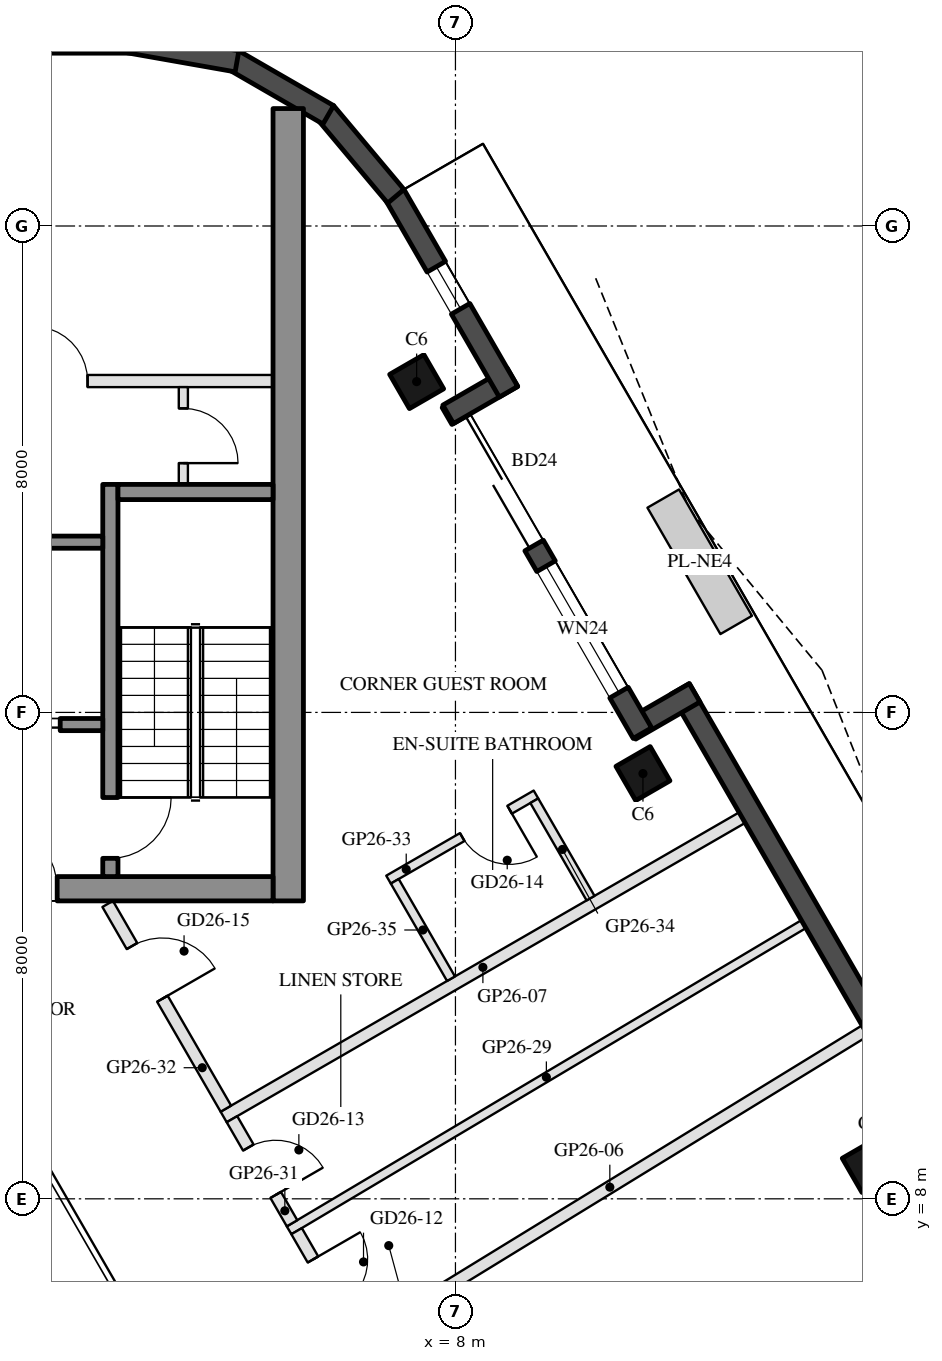
"""IFC4 building model, lengths in metres.
Left out: names, types, materials, properties, quantities, classifications, styles, units other than length and angle.
Written with IfcOpenShell. Run it as: python <this file> out.ifc"""

import sys

from ifc_helpers import new_model, si_unit, direction, frame, frame_2d, origin, origin_2d, place, context, subcontext, project, spatial, rectangle, hollow_rectangle, extrude, boolean, halfspace, element, fill, save


model = new_model("IFC4")
c1 = context("Model", 3, precision=1e-05, world=origin(), true_north=direction((0.0, 1.0)))
c2 = subcontext(c1, "Body", "Model", "MODEL_VIEW")
j1 = project(units=[si_unit("LENGTHUNIT", "METRE"), si_unit("PLANEANGLEUNIT", "RADIAN")], contexts=[c1])
p1 = place(None, origin())
s1 = spatial("IfcSite", under=j1, at=p1, CompositionType="ELEMENT")
p2 = place(p1, origin())
s2 = spatial("IfcBuilding", under=s1, at=p2, CompositionType="ELEMENT")
p3 = place(p2, frame((0.0, 0.0, 272.6)))
s3 = spatial("IfcBuildingStorey", under=s2, at=p3, CompositionType="ELEMENT", Elevation=272.6)
p4 = place(p3, frame((14.805, 8.548, 0.0), z_axis=(0.0, 0.0, 1.0), x_axis=(-0.5, 0.866025403784, 0.0)))
e1 = element("IfcColumn", 1, at=p4, inside=s3, PredefinedType="COLUMN", context=c2, shape_type="SweptSolid", body=[
    boolean("DIFFERENCE", extrude(hollow_rectangle(XDim=0.65, YDim=0.65, WallThickness=0.03, at=origin_2d()), origin(), (0.0, 0.0, 1.0), 3.7), halfspace(frame((0.0, 0.0, 3.663), z_axis=(0.0, 0.0, 1.0), x_axis=(1.0, 0.0, 0.0)), False)),
])
p5 = place(p3, frame((11.083, 14.994, 0.0), z_axis=(0.0, 0.0, 1.0), x_axis=(-0.5, 0.866025403784, 0.0)))
e2 = element("IfcColumn", 2, at=p5, inside=s3, PredefinedType="COLUMN", context=c2, shape_type="SweptSolid", body=[
    boolean("DIFFERENCE", extrude(hollow_rectangle(XDim=0.65, YDim=0.65, WallThickness=0.03, at=origin_2d()), origin(), (0.0, 0.0, 1.0), 3.7), halfspace(frame((0.0, 0.0, 3.66), z_axis=(0.0, 0.0, 1.0), x_axis=(1.0, 0.0, 0.0)), False)),
])
p6 = place(p3, frame((7.362, 21.44, 0.0), z_axis=(0.0, 0.0, 1.0), x_axis=(-0.5, 0.866025403784, 0.0)))
e3 = element("IfcColumn", 3, at=p6, inside=s3, PredefinedType="COLUMN", context=c2, shape_type="SweptSolid", body=[
    boolean("DIFFERENCE", extrude(hollow_rectangle(XDim=0.65, YDim=0.65, WallThickness=0.03, at=origin_2d()), origin(), (0.0, 0.0, 1.0), 3.7), halfspace(frame((0.0, 0.0, 3.653), z_axis=(0.0, 0.0, 1.0), x_axis=(1.0, 0.0, 0.0)), False)),
])
p7 = place(p3, frame((16.316, 8.381, 0.0), z_axis=(0.0, 0.0, 1.0), x_axis=(-0.500005190411, 0.866022407078, 0.0)))
e4 = element("IfcWall", 4, at=p7, inside=s3, PredefinedType="SOLIDWALL", context=c2, shape_type="SweptSolid", body=[
    extrude(rectangle(XDim=9.244, YDim=0.35, at=frame_2d((4.622, 0.0))), origin(), (0.0, 0.0, 1.0), 3.55),
])
p8 = place(p7, frame((1.575, 0.0, 0.3)))
e5 = element("IfcOpeningElement", 5, at=p8, cuts=e4, PredefinedType="OPENING", context=c2, shape_type="SweptSolid", body=[
    extrude(rectangle(XDim=0.8, YDim=2.65, at=frame_2d((0.4, 1.325))), frame((0.0, 0.185, 0.0), z_axis=(0.0, -1.0, 0.0), x_axis=(1.0, 0.0, 0.0)), (0.0, 0.0, 1.0), 0.37),
])
p9 = place(p3, frame((11.934, 16.322, 0.0), z_axis=(0.0, 0.0, 1.0), x_axis=(-0.866005645448, -0.500034220881, 0.0)))
e6 = element("IfcWall", 6, at=p9, inside=s3, PredefinedType="SOLIDWALL", context=c2, shape_type="SweptSolid", body=[
    extrude(rectangle(XDim=1.22, YDim=0.35, at=frame_2d((0.61, 0.0))), origin(), (0.0, 0.0, 1.0), 3.55),
])
p10 = place(p3, frame((11.075, 15.659, 0.0), z_axis=(0.0, 0.0, 1.0), x_axis=(-0.499983676521, 0.866034827944, 0.0)))
e7 = element("IfcWall", 7, at=p10, inside=s3, PredefinedType="SOLIDWALL", context=c2, shape_type="SweptSolid", body=[
    extrude(rectangle(XDim=6.283, YDim=0.35, at=frame_2d((3.142, 0.0))), origin(), (0.0, 0.0, 1.0), 3.55),
])
p11 = place(p10, frame((3.563, 0.0, 0.0)))
e8 = element("IfcOpeningElement", 8, at=p11, cuts=e7, PredefinedType="OPENING", context=c2, shape_type="SweptSolid", body=[
    extrude(rectangle(XDim=2.4, YDim=2.4, at=frame_2d((1.2, 1.2))), frame((0.0, 0.185, 0.0), z_axis=(0.0, -1.0, 0.0), x_axis=(1.0, 0.0, 0.0)), (0.0, 0.0, 1.0), 0.37),
])
p12 = place(p10, frame((0.77, 0.0, 0.3)))
e9 = element("IfcOpeningElement", 9, at=p12, cuts=e7, PredefinedType="OPENING", context=c2, shape_type="SweptSolid", body=[
    extrude(rectangle(XDim=2.4, YDim=2.65, at=frame_2d((1.2, 1.325))), frame((0.0, 0.185, 0.0), z_axis=(0.0, -1.0, 0.0), x_axis=(1.0, 0.0, 0.0)), (0.0, 0.0, 1.0), 0.37),
])
p13 = place(p3, frame((7.88, 20.903, 0.0), z_axis=(0.0, 0.0, 1.0), x_axis=(0.866005645448, 0.500034220881, 0.0)))
e10 = element("IfcWall", 10, at=p13, inside=s3, PredefinedType="SOLIDWALL", context=c2, shape_type="SweptSolid", body=[
    extrude(rectangle(XDim=1.22, YDim=0.35, at=frame_2d((0.61, 0.0))), origin(), (0.0, 0.0, 1.0), 3.55),
])
p14 = place(p3, frame((8.873, 21.274, 0.0), z_axis=(0.0, 0.0, 1.0), x_axis=(-0.50001992892, 0.866013897511, 0.0)))
e11 = element("IfcWall", 11, at=p14, inside=s3, PredefinedType="SOLIDWALL", context=c2, shape_type="SweptSolid", body=[
    extrude(rectangle(XDim=3.741, YDim=0.35, at=frame_2d((1.871, 0.0))), origin(), (0.0, 0.0, 1.0), 3.55),
])
p15 = place(p14, frame((1.575, 0.0, 0.3)))
e12 = element("IfcOpeningElement", 12, at=p15, cuts=e11, PredefinedType="OPENING", context=c2, shape_type="SweptSolid", body=[
    extrude(rectangle(XDim=0.8, YDim=2.65, at=frame_2d((0.4, 1.325))), frame((0.0, 0.185, 0.0), z_axis=(0.0, -1.0, 0.0), x_axis=(1.0, 0.0, 0.0)), (0.0, 0.0, 1.0), 0.37),
])
p16 = place(p3, frame((7.019, 24.489, 0.0), z_axis=(0.0, 0.0, 1.0), x_axis=(-0.642756114672, 0.766070869471, 0.0)))
e13 = element("IfcWall", 13, at=p16, inside=s3, PredefinedType="SOLIDWALL", context=c2, shape_type="SweptSolid", body=[
    extrude(rectangle(XDim=1.8, YDim=0.35, at=frame_2d((0.9, 0.0))), origin(), (0.0, 0.0, 1.0), 3.55),
])
for number, where, z_axis, x_axis in (
    (14, (5.909, 25.829, 0.0), (0.0, 0.0, 1.0), (-0.866, 0.5, 0.0)),
    (15, (4.408, 26.708, 0.0), (0.0, 0.0, 1.0), (-0.985, 0.174, 0.0)),
):
    element("IfcWall", number, at=place(p3, frame(where, z_axis=z_axis, x_axis=x_axis)), inside=s3, PredefinedType="SOLIDWALL", context=c2, shape_type="SweptSolid", body=[
        extrude(rectangle(XDim=1.8, YDim=0.35, at=frame_2d((0.9, 0.0))), origin(), (0.0, 0.0, 1.0), 3.55),
    ])
p17 = place(p3, frame((2.666, 27.018, 0.0), z_axis=(0.0, 0.0, 1.0), x_axis=(-1.0, 0.0, 0.0)))
e16 = element("IfcWall", 16, at=p17, inside=s3, PredefinedType="SOLIDWALL", context=c2, shape_type="SweptSolid", body=[
    extrude(rectangle(XDim=5.331, YDim=0.35, at=frame_2d((2.666, 0.0))), origin(), (0.0, 0.0, 1.0), 3.55),
])
p18 = place(p3, frame((5.25, 12.9, 0.0), z_axis=(0.0, 0.0, 1.0), x_axis=(0.0, 1.0, 0.0)))
e17 = element("IfcWall", 17, at=p18, inside=s3, PredefinedType="SHEAR", context=c2, shape_type="SweptSolid", body=[
    extrude(rectangle(XDim=13.031, YDim=0.5, at=frame_2d((6.516, 0.0))), origin(), (0.0, 0.0, 1.0), 3.5),
])
p19 = place(p3, frame((5.0, 13.1, 0.0), z_axis=(0.0, 0.0, 1.0), x_axis=(-1.0, 0.0, 0.0)))
e18 = element("IfcWall", 18, at=p19, inside=s3, PredefinedType="SHEAR", context=c2, shape_type="SweptSolid", body=[
    extrude(rectangle(XDim=10.0, YDim=0.4, at=frame_2d((5.0, 0.0))), origin(), (0.0, 0.0, 1.0), 3.5),
])
p20 = place(p19, frame((3.55, 0.0, 0.0)))
e19 = element("IfcOpeningElement", 19, at=p20, cuts=e18, PredefinedType="OPENING", context=c2, shape_type="SweptSolid", body=[
    extrude(rectangle(XDim=1.1, YDim=2.1, at=frame_2d((0.55, 1.05))), frame((0.0, 0.21, 0.0), z_axis=(0.0, -1.0, 0.0), x_axis=(1.0, 0.0, 0.0)), (0.0, 0.0, 1.0), 0.42),
])
p21 = place(p19, frame((5.85, 0.0, 0.0)))
e20 = element("IfcOpeningElement", 20, at=p21, cuts=e18, PredefinedType="OPENING", context=c2, shape_type="SweptSolid", body=[
    extrude(rectangle(XDim=1.4, YDim=2.1, at=frame_2d((0.7, 1.05))), frame((0.0, 0.21, 0.0), z_axis=(0.0, -1.0, 0.0), x_axis=(1.0, 0.0, 0.0)), (0.0, 0.0, 1.0), 0.42),
])
p22 = place(p3, frame((2.325, 13.3, 0.0), z_axis=(0.0, 0.0, 1.0), x_axis=(0.0, 1.0, 0.0)))
e21 = element("IfcWall", 21, at=p22, inside=s3, PredefinedType="SHEAR", context=c2, shape_type="SweptSolid", body=[
    extrude(rectangle(XDim=6.45, YDim=0.25, at=frame_2d((3.225, 0.0))), origin(), (0.0, 0.0, 1.0), 3.5),
])
p23 = place(p22, frame((0.3, 0.0, 0.0)))
e22 = element("IfcOpeningElement", 22, at=p23, cuts=e21, PredefinedType="OPENING", context=c2, shape_type="SweptSolid", body=[
    extrude(rectangle(XDim=1.0, YDim=2.1, at=frame_2d((0.5, 1.05))), frame((0.0, 0.135, 0.0), z_axis=(0.0, -1.0, 0.0), x_axis=(1.0, 0.0, 0.0)), (0.0, 0.0, 1.0), 0.27),
])
p24 = place(p3, frame((5.0, 19.625, 0.0), z_axis=(0.0, 0.0, 1.0), x_axis=(-1.0, 0.0, 0.0)))
e23 = element("IfcWall", 23, at=p24, inside=s3, PredefinedType="SHEAR", context=c2, shape_type="SweptSolid", body=[
    extrude(rectangle(XDim=2.55, YDim=0.25, at=frame_2d((1.275, 0.0))), origin(), (0.0, 0.0, 1.0), 3.5),
])
p25 = place(p3, frame((2.2, 18.8, 0.0), z_axis=(0.0, 0.0, 1.0), x_axis=(-1.0, 0.0, 0.0)))
e24 = element("IfcWall", 24, at=p25, inside=s3, PredefinedType="SHEAR", context=c2, shape_type="SweptSolid", body=[
    extrude(rectangle(XDim=2.8, YDim=0.2, at=frame_2d((1.4, 0.0))), origin(), (0.0, 0.0, 1.0), 3.5),
])
p26 = place(p3, frame((2.2, 15.8, 0.0), z_axis=(0.0, 0.0, 1.0), x_axis=(-1.0, 0.0, 0.0)))
e25 = element("IfcWall", 25, at=p26, inside=s3, PredefinedType="SHEAR", context=c2, shape_type="SweptSolid", body=[
    extrude(rectangle(XDim=2.8, YDim=0.2, at=frame_2d((1.4, 0.0))), origin(), (0.0, 0.0, 1.0), 3.5),
])
p27 = place(p26, frame((0.7, 0.0, 0.0)))
e26 = element("IfcOpeningElement", 26, at=p27, cuts=e25, PredefinedType="OPENING", context=c2, shape_type="SweptSolid", body=[
    extrude(rectangle(XDim=1.2, YDim=2.1, at=frame_2d((0.6, 1.05))), frame((0.0, 0.11, 0.0), z_axis=(0.0, -1.0, 0.0), x_axis=(1.0, 0.0, 0.0)), (0.0, 0.0, 1.0), 0.22),
])
p28 = place(p3, frame((5.0, 21.45, 0.0), z_axis=(0.0, 0.0, 1.0), x_axis=(-1.0, 0.0, 0.0)))
e27 = element("IfcWall", 27, at=p28, inside=s3, PredefinedType="PARTITIONING", context=c2, shape_type="SweptSolid", body=[
    extrude(rectangle(XDim=5.4, YDim=0.2, at=frame_2d((2.7, 0.0))), origin(), (0.0, 0.0, 1.0), 3.5),
])
p29 = place(p28, frame((3.05, 0.0, 0.0)))
e28 = element("IfcOpeningElement", 28, at=p29, cuts=e27, PredefinedType="OPENING", context=c2, shape_type="SweptSolid", body=[
    extrude(rectangle(XDim=0.9, YDim=2.1, at=frame_2d((0.45, 1.05))), frame((0.0, 0.11, 0.0), z_axis=(0.0, -1.0, 0.0), x_axis=(1.0, 0.0, 0.0)), (0.0, 0.0, 1.0), 0.22),
])
p30 = place(p3, frame((3.525, 19.75, 0.0), z_axis=(0.0, 0.0, 1.0), x_axis=(0.0, 1.0, 0.0)))
e29 = element("IfcWall", 29, at=p30, inside=s3, PredefinedType="PARTITIONING", context=c2, shape_type="SweptSolid", body=[
    extrude(rectangle(XDim=1.6, YDim=0.15, at=frame_2d((0.8, 0.0))), origin(), (0.0, 0.0, 1.0), 3.5),
])
p31 = place(p30, frame((0.35, 0.0, 0.0)))
e30 = element("IfcOpeningElement", 30, at=p31, cuts=e29, PredefinedType="OPENING", context=c2, shape_type="SweptSolid", body=[
    extrude(rectangle(XDim=0.9, YDim=2.1, at=frame_2d((0.45, 1.05))), frame((0.0, 0.085, 0.0), z_axis=(0.0, -1.0, 0.0), x_axis=(1.0, 0.0, 0.0)), (0.0, 0.0, 1.0), 0.17),
])
p32 = place(p3, frame((14.737, 10.766, 0.0), z_axis=(0.0, 0.0, 1.0), x_axis=(-0.852501485732, -0.522724800277, 0.0)))
e31 = element("IfcWall", 31, at=p32, inside=s3, PredefinedType="PARTITIONING", context=c2, shape_type="SweptSolid", body=[
    extrude(rectangle(XDim=9.849, YDim=0.2, at=frame_2d((4.925, 0.0))), origin(), (0.0, 0.0, 1.0), 3.1),
])
p33 = place(p3, frame((12.715, 14.269, 0.0), z_axis=(0.0, 0.0, 1.0), x_axis=(-0.866024954444, -0.500000778279, 0.0)))
e32 = element("IfcWall", 32, at=p33, inside=s3, PredefinedType="PARTITIONING", context=c2, shape_type="SweptSolid", body=[
    extrude(rectangle(XDim=9.846, YDim=0.2, at=frame_2d((4.923, 0.0))), origin(), (0.0, 0.0, 1.0), 3.1),
])
p34 = place(p3, frame((13.726, 12.518, 0.0), z_axis=(0.0, 0.0, 1.0), x_axis=(-0.859340362174, -0.511404088699, 0.0)))
e33 = element("IfcWall", 33, at=p34, inside=s3, PredefinedType="PARTITIONING", context=c2, shape_type="SweptSolid", body=[
    extrude(rectangle(XDim=9.847, YDim=0.15, at=frame_2d((4.923, 0.0))), origin(), (0.0, 0.0, 1.0), 3.0),
])
p35 = place(p3, frame((5.388, 7.468, 0.0), z_axis=(0.0, 0.0, 1.0), x_axis=(0.500071767444, -0.865983964866, 0.0)))
e34 = element("IfcWall", 34, at=p35, inside=s3, PredefinedType="PARTITIONING", context=c2, shape_type="SweptSolid", body=[
    extrude(rectangle(XDim=1.976, YDim=0.2, at=frame_2d((0.988, 0.0))), origin(), (0.0, 0.0, 1.0), 3.0),
])
p36 = place(p35, frame((0.538, 0.0, 0.0)))
e35 = element("IfcOpeningElement", 35, at=p36, cuts=e34, PredefinedType="OPENING", context=c2, shape_type="SweptSolid", body=[
    extrude(rectangle(XDim=0.9, YDim=2.1, at=frame_2d((0.45, 1.05))), frame((0.0, 0.11, 0.0), z_axis=(0.0, -1.0, 0.0), x_axis=(1.0, 0.0, 0.0)), (0.0, 0.0, 1.0), 0.22),
])
p37 = place(p3, frame((4.325, 9.31, 0.0), z_axis=(0.0, 0.0, 1.0), x_axis=(0.499925626596, -0.866068339032, 0.0)))
e36 = element("IfcWall", 36, at=p37, inside=s3, PredefinedType="PARTITIONING", context=c2, shape_type="SweptSolid", body=[
    extrude(rectangle(XDim=1.976, YDim=0.2, at=frame_2d((0.988, 0.0))), origin(), (0.0, 0.0, 1.0), 3.55),
])
p38 = place(p37, frame((0.538, 0.0, 0.0)))
e37 = element("IfcOpeningElement", 37, at=p38, cuts=e36, PredefinedType="OPENING", context=c2, shape_type="SweptSolid", body=[
    extrude(rectangle(XDim=0.9, YDim=2.1, at=frame_2d((0.45, 1.05))), frame((0.0, 0.11, 0.0), z_axis=(0.0, -1.0, 0.0), x_axis=(1.0, 0.0, 0.0)), (0.0, 0.0, 1.0), 0.22),
])
p39 = place(p3, frame((2.281, 12.85, 0.0), z_axis=(0.0, 0.0, 1.0), x_axis=(0.500008716408, -0.866020371305, 0.0)))
e38 = element("IfcWall", 38, at=p39, inside=s3, PredefinedType="PARTITIONING", context=c2, shape_type="SweptSolid", body=[
    extrude(rectangle(XDim=3.888, YDim=0.2, at=frame_2d((1.944, 0.0))), origin(), (0.0, 0.0, 1.0), 3.0),
])
p40 = place(p39, frame((0.8, 0.0, 0.0)))
e39 = element("IfcOpeningElement", 39, at=p40, cuts=e38, PredefinedType="OPENING", context=c2, shape_type="SweptSolid", body=[
    extrude(rectangle(XDim=1.0, YDim=2.1, at=frame_2d((0.5, 1.05))), frame((0.0, 0.11, 0.0), z_axis=(0.0, -1.0, 0.0), x_axis=(1.0, 0.0, 0.0)), (0.0, 0.0, 1.0), 0.22),
])
p41 = place(p3, frame((9.324, 14.65, 0.0), z_axis=(0.0, 0.0, 1.0), x_axis=(-0.866034573852, -0.49998411664, 0.0)))
e40 = element("IfcWall", 40, at=p41, inside=s3, PredefinedType="PARTITIONING", context=c2, shape_type="SweptSolid", body=[
    extrude(rectangle(XDim=2.8, YDim=0.15, at=frame_2d((1.4, 0.0))), origin(), (0.0, 0.0, 1.0), 3.55),
])
p42 = place(p41, frame((0.5, 0.0, 0.0)))
e41 = element("IfcOpeningElement", 41, at=p42, cuts=e40, PredefinedType="OPENING", context=c2, shape_type="SweptSolid", body=[
    extrude(rectangle(XDim=0.9, YDim=2.1, at=frame_2d((0.45, 1.05))), frame((0.0, 0.085, 0.0), z_axis=(0.0, -1.0, 0.0), x_axis=(1.0, 0.0, 0.0)), (0.0, 0.0, 1.0), 0.17),
])
for number, where, z_axis, x_axis in (
    (42, (10.222, 12.945, 0.0), (0.0, 0.0, 1.0), (-0.5, 0.866, 0.0)),
    (43, (7.927, 11.62, 0.0), (0.0, 0.0, 1.0), (-0.5, 0.866, 0.0)),
):
    element("IfcWall", number, at=place(p3, frame(where, z_axis=z_axis, x_axis=x_axis)), inside=s3, PredefinedType="PARTITIONING", context=c2, shape_type="SweptSolid", body=[
        extrude(rectangle(XDim=1.85, YDim=0.15, at=frame_2d((0.925, 0.0))), origin(), (0.0, 0.0, 1.0), 3.0),
    ])
p43 = place(p11, frame((2.4, 0.0, 0.0), z_axis=(0.0, 0.0, 1.0), x_axis=(-1.0, 0.0, 0.0)))
e44 = element("IfcDoor", 44, at=p43, inside=s3, OperationType="SLIDING_TO_LEFT", PredefinedType="DOOR", context=c2, shape_type="SweptSolid", body=[
    extrude(rectangle(XDim=2.4, YDim=2.4, at=frame_2d((1.2, 1.2))), frame((0.0, 0.025, 0.0), z_axis=(0.0, -1.0, 0.0), x_axis=(1.0, 0.0, 0.0)), (0.0, 0.0, 1.0), 0.05),
])
fill(e8, e44)
p44 = place(p12, origin())
e45 = element("IfcWindow", 45, at=p44, inside=s3, PartitioningType="SINGLE_PANEL", PredefinedType="WINDOW", context=c2, shape_type="SweptSolid", body=[
    extrude(rectangle(XDim=2.4, YDim=2.65, at=frame_2d((1.2, 1.325))), frame((0.0, 0.03, 0.0), z_axis=(0.0, -1.0, 0.0), x_axis=(1.0, 0.0, 0.0)), (0.0, 0.0, 1.0), 0.06),
])
fill(e9, e45)
p45 = place(p15, origin())
e46 = element("IfcWindow", 46, at=p45, inside=s3, PartitioningType="SINGLE_PANEL", PredefinedType="WINDOW", context=c2, shape_type="SweptSolid", body=[
    extrude(rectangle(XDim=0.8, YDim=2.65, at=frame_2d((0.4, 1.325))), frame((0.0, 0.03, 0.0), z_axis=(0.0, -1.0, 0.0), x_axis=(1.0, 0.0, 0.0)), (0.0, 0.0, 1.0), 0.06),
])
fill(e12, e46)
p46 = place(p27, origin())
e47 = element("IfcDoor", 47, at=p46, inside=s3, OperationType="DOUBLE_DOOR_SLIDING", PredefinedType="DOOR", context=c2, shape_type="SweptSolid", body=[
    extrude(rectangle(XDim=1.2, YDim=2.1, at=frame_2d((0.6, 1.05))), frame((0.0, 0.025, 0.0), z_axis=(0.0, -1.0, 0.0), x_axis=(1.0, 0.0, 0.0)), (0.0, 0.0, 1.0), 0.05),
])
fill(e26, e47)
p47 = place(p31, frame((0.9, 0.0, 0.0), z_axis=(0.0, 0.0, 1.0), x_axis=(-1.0, 0.0, 0.0)))
e48 = element("IfcDoor", 48, at=p47, inside=s3, OperationType="SINGLE_SWING_RIGHT", PredefinedType="DOOR", context=c2, shape_type="SweptSolid", body=[
    extrude(rectangle(XDim=0.9, YDim=2.1, at=frame_2d((0.45, 1.05))), frame((0.0, 0.025, 0.0), z_axis=(0.0, -1.0, 0.0), x_axis=(1.0, 0.0, 0.0)), (0.0, 0.0, 1.0), 0.05),
])
fill(e30, e48)
p48 = place(p29, frame((0.9, 0.0, 0.0), z_axis=(0.0, 0.0, 1.0), x_axis=(-1.0, 0.0, 0.0)))
e49 = element("IfcDoor", 49, at=p48, inside=s3, OperationType="SINGLE_SWING_LEFT", PredefinedType="DOOR", context=c2, shape_type="SweptSolid", body=[
    extrude(rectangle(XDim=0.9, YDim=2.1, at=frame_2d((0.45, 1.05))), frame((0.0, 0.025, 0.0), z_axis=(0.0, -1.0, 0.0), x_axis=(1.0, 0.0, 0.0)), (0.0, 0.0, 1.0), 0.05),
])
fill(e28, e49)
p49 = place(p20, frame((1.1, 0.0, 0.0), z_axis=(0.0, 0.0, 1.0), x_axis=(-1.0, 0.0, 0.0)))
e50 = element("IfcDoor", 50, at=p49, inside=s3, OperationType="SINGLE_SWING_LEFT", PredefinedType="DOOR", context=c2, shape_type="SweptSolid", body=[
    extrude(rectangle(XDim=1.1, YDim=2.1, at=frame_2d((0.55, 1.05))), frame((0.0, 0.025, 0.0), z_axis=(0.0, -1.0, 0.0), x_axis=(1.0, 0.0, 0.0)), (0.0, 0.0, 1.0), 0.05),
])
fill(e19, e50)
p50 = place(p23, frame((1.0, 0.0, 0.0), z_axis=(0.0, 0.0, 1.0), x_axis=(-1.0, 0.0, 0.0)))
e51 = element("IfcDoor", 51, at=p50, inside=s3, OperationType="SINGLE_SWING_LEFT", PredefinedType="DOOR", context=c2, shape_type="SweptSolid", body=[
    extrude(rectangle(XDim=1.0, YDim=2.1, at=frame_2d((0.5, 1.05))), frame((0.0, 0.025, 0.0), z_axis=(0.0, -1.0, 0.0), x_axis=(1.0, 0.0, 0.0)), (0.0, 0.0, 1.0), 0.05),
])
fill(e22, e51)
p51 = place(p36, origin())
e52 = element("IfcDoor", 52, at=p51, inside=s3, OperationType="SINGLE_SWING_LEFT", PredefinedType="DOOR", context=c2, shape_type="SweptSolid", body=[
    extrude(rectangle(XDim=0.9, YDim=2.1, at=frame_2d((0.45, 1.05))), frame((0.0, 0.025, 0.0), z_axis=(0.0, -1.0, 0.0), x_axis=(1.0, 0.0, 0.0)), (0.0, 0.0, 1.0), 0.05),
])
fill(e35, e52)
p52 = place(p38, origin())
e53 = element("IfcDoor", 53, at=p52, inside=s3, OperationType="SINGLE_SWING_RIGHT", PredefinedType="DOOR", context=c2, shape_type="SweptSolid", body=[
    extrude(rectangle(XDim=0.9, YDim=2.1, at=frame_2d((0.45, 1.05))), frame((0.0, 0.025, 0.0), z_axis=(0.0, -1.0, 0.0), x_axis=(1.0, 0.0, 0.0)), (0.0, 0.0, 1.0), 0.05),
])
fill(e37, e53)
p53 = place(p42, origin())
e54 = element("IfcDoor", 54, at=p53, inside=s3, OperationType="SINGLE_SWING_LEFT", PredefinedType="DOOR", context=c2, shape_type="SweptSolid", body=[
    extrude(rectangle(XDim=0.9, YDim=2.1, at=frame_2d((0.45, 1.05))), frame((0.0, 0.025, 0.0), z_axis=(0.0, -1.0, 0.0), x_axis=(1.0, 0.0, 0.0)), (0.0, 0.0, 1.0), 0.05),
])
fill(e41, e54)
p54 = place(p40, origin())
e55 = element("IfcDoor", 55, at=p54, inside=s3, OperationType="SINGLE_SWING_RIGHT", PredefinedType="DOOR", context=c2, shape_type="SweptSolid", body=[
    extrude(rectangle(XDim=1.0, YDim=2.1, at=frame_2d((0.5, 1.05))), frame((0.0, 0.025, 0.0), z_axis=(0.0, -1.0, 0.0), x_axis=(1.0, 0.0, 0.0)), (0.0, 0.0, 1.0), 0.05),
])
fill(e39, e55)
save(model, sys.argv[1])
